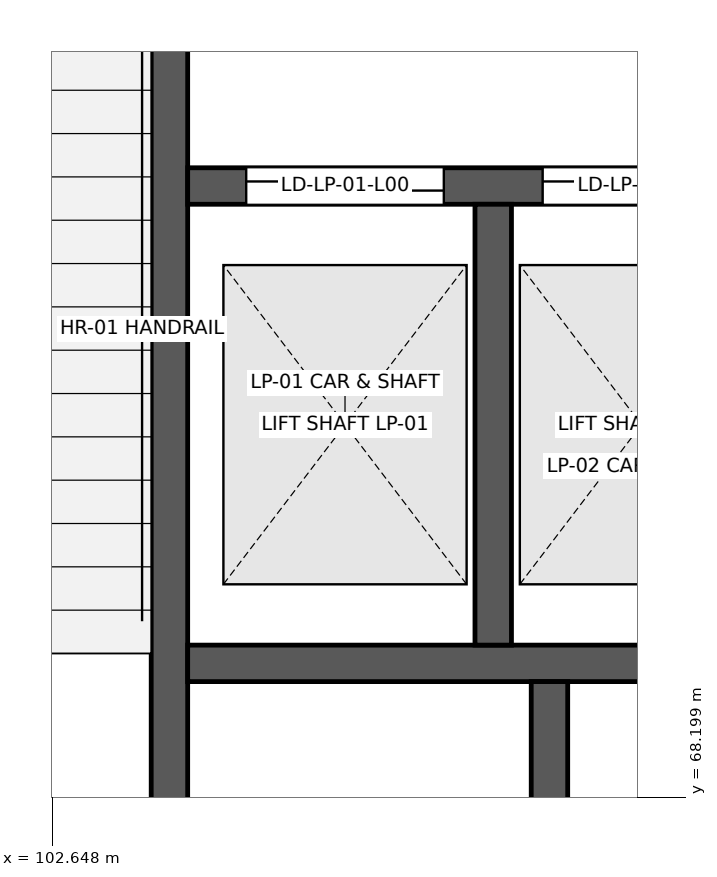
"""IFC4 building model, lengths in metres.
Left out: names, types, materials, properties, quantities, classifications, styles, units other than length and angle.
Written with IfcOpenShell. Run it as: python <this file> out.ifc"""

import sys

from ifc_helpers import new_model, si_unit, direction, frame, frame_2d, origin, place, context, subcontext, project, spatial, rectangle, extrude, element, fill, save


model = new_model("IFC4")
c1 = context("Model", 3, precision=1e-05, world=origin(), true_north=direction((0.0, 1.0)))
c2 = subcontext(c1, "Body", "Model", "MODEL_VIEW")
j1 = project(units=[si_unit("LENGTHUNIT", "METRE"), si_unit("PLANEANGLEUNIT", "RADIAN")], contexts=[c1])
p1 = place(None, origin())
s1 = spatial("IfcSite", under=j1, at=p1, CompositionType="ELEMENT")
p2 = place(p1, origin())
s2 = spatial("IfcBuilding", under=s1, at=p2, CompositionType="ELEMENT")
p3 = place(p2, origin())
s3 = spatial("IfcBuildingStorey", under=s2, at=p3, CompositionType="ELEMENT", Elevation=0.0)
p4 = place(p3, frame((103.42, 66.96, 0.0), z_axis=(0.0, 0.0, 1.0), x_axis=(0.0, 1.0, 0.0)))
e1 = element("IfcWall", 1, at=p4, inside=s3, PredefinedType="SHEAR", context=c2, shape_type="SweptSolid", body=[
    extrude(rectangle(XDim=8.28, YDim=0.24, at=frame_2d((4.14, 0.0))), origin(), (0.0, 0.0, 1.0), 5.21),
])
p5 = place(p4, frame((6.49, 0.0, 0.0)))
e2 = element("IfcOpeningElement", 2, at=p5, cuts=e1, PredefinedType="OPENING", context=c2, shape_type="SweptSolid", body=[
    extrude(rectangle(XDim=1.3, YDim=2.2, at=frame_2d((0.65, 1.1))), frame((0.0, 0.135, 0.0), z_axis=(0.0, -1.0, 0.0), x_axis=(1.0, 0.0, 0.0)), (0.0, 0.0, 1.0), 0.27),
])
p6 = place(p3, frame((103.54, 72.22, 0.0), z_axis=(0.0, 0.0, 1.0), x_axis=(1.0, 0.0, 0.0)))
e3 = element("IfcWall", 3, at=p6, inside=s3, PredefinedType="SHEAR", context=c2, shape_type="SweptSolid", body=[
    extrude(rectangle(XDim=3.9, YDim=0.24, at=frame_2d((1.95, 0.0))), origin(), (0.0, 0.0, 1.0), 5.21),
])
p7 = place(p6, frame((0.385, 0.0, 0.0)))
e4 = element("IfcOpeningElement", 4, at=p7, cuts=e3, PredefinedType="OPENING", context=c2, shape_type="SweptSolid", body=[
    extrude(rectangle(XDim=1.3, YDim=2.2, at=frame_2d((0.65, 1.1))), frame((0.0, 0.135, 0.0), z_axis=(0.0, -1.0, 0.0), x_axis=(1.0, 0.0, 0.0)), (0.0, 0.0, 1.0), 0.27),
])
p8 = place(p6, frame((2.335, 0.0, 0.0)))
e5 = element("IfcOpeningElement", 5, at=p8, cuts=e3, PredefinedType="OPENING", context=c2, shape_type="SweptSolid", body=[
    extrude(rectangle(XDim=1.3, YDim=2.2, at=frame_2d((0.65, 1.1))), frame((0.0, 0.135, 0.0), z_axis=(0.0, -1.0, 0.0), x_axis=(1.0, 0.0, 0.0)), (0.0, 0.0, 1.0), 0.27),
])
p9 = place(p3, frame((103.54, 69.08, 0.0), z_axis=(0.0, 0.0, 1.0), x_axis=(1.0, 0.0, 0.0)))
e6 = element("IfcWall", 6, at=p9, inside=s3, PredefinedType="SHEAR", context=c2, shape_type="SweptSolid", body=[
    extrude(rectangle(XDim=3.9, YDim=0.24, at=frame_2d((1.95, 0.0))), origin(), (0.0, 0.0, 1.0), 5.21),
])
p10 = place(p3, frame((105.55, 69.2, 0.0), z_axis=(0.0, 0.0, 1.0), x_axis=(0.0, 1.0, 0.0)))
e7 = element("IfcWall", 7, at=p10, inside=s3, PredefinedType="SHEAR", context=c2, shape_type="SweptSolid", body=[
    extrude(rectangle(XDim=2.9, YDim=0.24, at=frame_2d((1.45, 0.0))), origin(), (0.0, 0.0, 1.0), 5.21),
])
p11 = place(p3, frame((105.92, 66.96, 0.0), z_axis=(0.0, 0.0, 1.0), x_axis=(0.0, 1.0, 0.0)))
e8 = element("IfcWall", 8, at=p11, inside=s3, PredefinedType="SHEAR", context=c2, shape_type="SweptSolid", body=[
    extrude(rectangle(XDim=2.0, YDim=0.24, at=frame_2d((1.0, 0.0))), origin(), (0.0, 0.0, 1.0), 5.21),
])
p12 = place(p7, origin())
e9 = element("IfcDoor", 9, at=p12, inside=s3, OperationType="DOUBLE_DOOR_SLIDING", PredefinedType="DOOR", context=c2, shape_type="SweptSolid", body=[
    extrude(rectangle(XDim=1.3, YDim=2.2, at=frame_2d((0.65, 1.1))), frame((0.0, 0.025, 0.0), z_axis=(0.0, -1.0, 0.0), x_axis=(1.0, 0.0, 0.0)), (0.0, 0.0, 1.0), 0.05),
])
fill(e4, e9)
p13 = place(p8, origin())
e10 = element("IfcDoor", 10, at=p13, inside=s3, OperationType="DOUBLE_DOOR_SLIDING", PredefinedType="DOOR", context=c2, shape_type="SweptSolid", body=[
    extrude(rectangle(XDim=1.3, YDim=2.2, at=frame_2d((0.65, 1.1))), frame((0.0, 0.025, 0.0), z_axis=(0.0, -1.0, 0.0), x_axis=(1.0, 0.0, 0.0)), (0.0, 0.0, 1.0), 0.05),
])
fill(e5, e10)
save(model, sys.argv[1])
